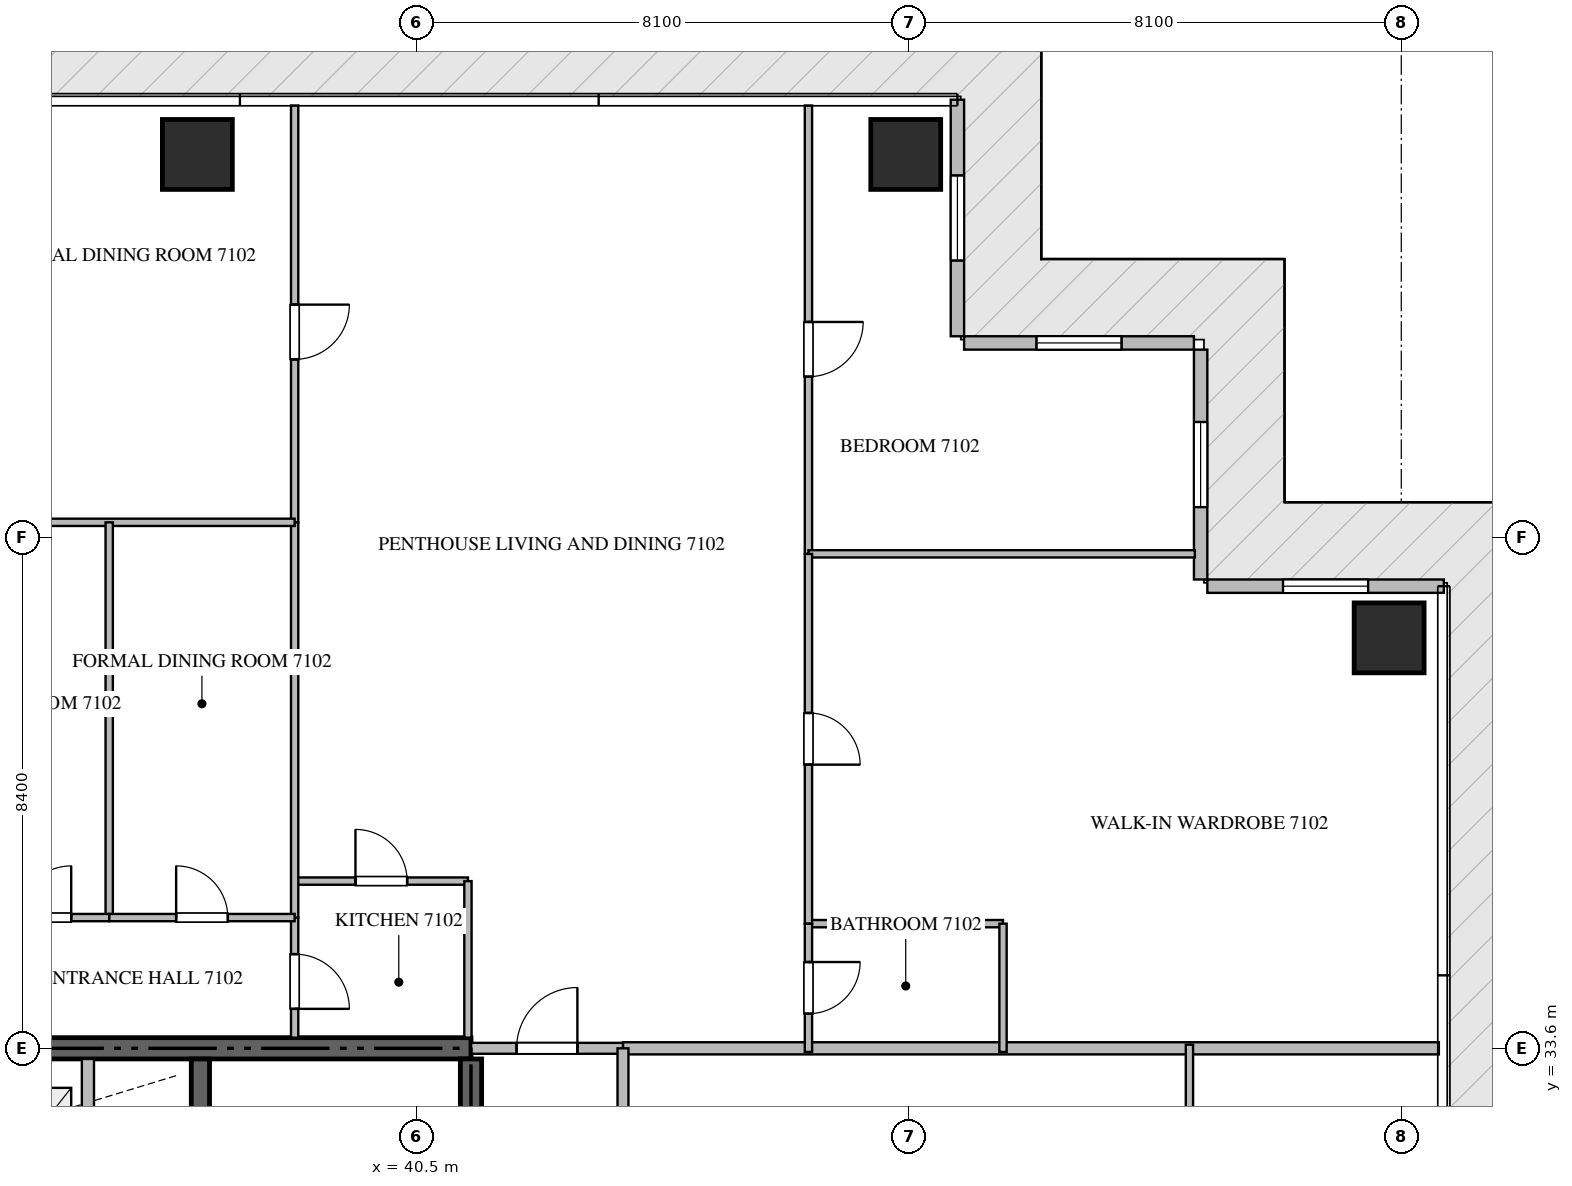
"""IFC4 building model, lengths in metres.
Left out: names, types, materials, properties, quantities, classifications, styles, units other than length and angle.
Written with IfcOpenShell. Run it as: python <this file> out.ifc"""

import sys

from ifc_helpers import new_model, si_unit, direction, frame, frame_2d, origin, origin_2d, place, context, subcontext, project, spatial, rectangle, extrude, source, transform, mapped, element, fill, save


model = new_model("IFC4")
c1 = context("Model", 3, precision=1e-05, world=origin(), true_north=direction((0.0, 1.0)))
c2 = subcontext(c1, "Body", "Model", "MODEL_VIEW")
j1 = project(units=[si_unit("LENGTHUNIT", "METRE"), si_unit("PLANEANGLEUNIT", "RADIAN")], contexts=[c1])
p1 = place(None, origin())
s1 = spatial("IfcSite", under=j1, at=p1, CompositionType="ELEMENT")
p2 = place(p1, origin())
s2 = spatial("IfcBuilding", under=s1, at=p2, CompositionType="ELEMENT")
p3 = place(p2, frame((0.0, 0.0, 283.6)))
s3 = spatial("IfcBuildingStorey", under=s2, at=p3, CompositionType="ELEMENT", Elevation=283.6)
p4 = place(p3, frame((41.4, 33.6, -0.26), z_axis=(0.0, 0.0, 1.0), x_axis=(-1.0, 0.0, 0.0)))
e1 = element("IfcWall", 1, at=p4, inside=s3, PredefinedType="SHEAR", context=c2, shape_type="SweptSolid", body=[
    extrude(rectangle(XDim=18.0, YDim=0.35, at=frame_2d((9.0, 0.0))), origin(), (0.0, 0.0, 1.0), 3.668),
])
p5 = place(p3, frame((41.4, 27.75, -0.26), z_axis=(0.0, 0.0, 1.0), x_axis=(0.0, 1.0, 0.0)))
e2 = element("IfcWall", 2, at=p5, inside=s3, PredefinedType="SHEAR", context=c2, shape_type="SweptSolid", body=[
    extrude(rectangle(XDim=5.675, YDim=0.35, at=frame_2d((2.837, 0.0))), origin(), (0.0, 0.0, 1.0), 3.668),
])
p6 = place(p3, frame((36.95, 27.05, -0.26), z_axis=(0.0, 0.0, 1.0), x_axis=(0.0, 1.0, 0.0)))
e3 = element("IfcWall", 3, at=p6, inside=s3, PredefinedType="SHEAR", context=c2, shape_type="SweptSolid", body=[
    extrude(rectangle(XDim=6.375, YDim=0.3, at=frame_2d((3.188, 0.0))), origin(), (0.0, 0.0, 1.0), 3.668),
])
m1 = source(origin(), c2, "Body", "SweptSolid", [
    extrude(rectangle(XDim=1.15, YDim=1.15, at=origin_2d()), origin(), (0.0, 0.0, 1.0), 3.67),
])
for number, where, z_axis, x_axis in (
    (4, (36.9, 48.3, -0.26), (0.0, 0.0, 1.0), (1.0, 0.0, 0.0)),
    (5, (48.55, 48.3, -0.26), (0.0, 0.0, 1.0), (1.0, 0.0, 0.0)),
    (6, (56.5, 40.35, -0.26), (0.0, 0.0, 1.0), (1.0, 0.0, 0.0)),
):
    element("IfcColumn", number, at=place(p3, frame(where, z_axis=z_axis, x_axis=x_axis)), inside=s3, PredefinedType="COLUMN", context=c2, shape_type="MappedRepresentation", body=[
        mapped(m1, transform((0.0, 0.0, 0.0), scale=1.0)),
    ])
p7 = place(p3, frame((57.4, 41.2, 0.0), z_axis=(0.0, 0.0, 1.0), x_axis=(-1.0, 0.0, 0.0)))
e7 = element("IfcWall", 7, at=p7, inside=s3, PredefinedType="ELEMENTEDWALL", context=c2, shape_type="SweptSolid", body=[
    extrude(rectangle(XDim=3.89, YDim=0.22, at=frame_2d((1.945, 0.0))), origin(), (0.0, 0.0, 1.0), 3.395),
])
p8 = place(p7, frame((1.245, 0.0, 0.65)))
e8 = element("IfcOpeningElement", 8, at=p8, cuts=e7, PredefinedType="OPENING", context=c2, shape_type="SweptSolid", body=[
    extrude(rectangle(XDim=1.4, YDim=1.35, at=frame_2d((0.7, 0.675))), frame((0.0, 0.12, 0.0), z_axis=(0.0, -1.0, 0.0), x_axis=(1.0, 0.0, 0.0)), (0.0, 0.0, 1.0), 0.24),
])
p9 = place(p3, frame((53.4, 41.31, 0.0), z_axis=(0.0, 0.0, 1.0), x_axis=(0.0, 1.0, 0.0)))
e9 = element("IfcWall", 9, at=p9, inside=s3, PredefinedType="ELEMENTEDWALL", context=c2, shape_type="SweptSolid", body=[
    extrude(rectangle(XDim=3.78, YDim=0.22, at=frame_2d((1.89, 0.0))), origin(), (0.0, 0.0, 1.0), 3.395),
])
p10 = place(p9, frame((1.19, 0.0, 0.65)))
e10 = element("IfcOpeningElement", 10, at=p10, cuts=e9, PredefinedType="OPENING", context=c2, shape_type="SweptSolid", body=[
    extrude(rectangle(XDim=1.4, YDim=1.35, at=frame_2d((0.7, 0.675))), frame((0.0, 0.12, 0.0), z_axis=(0.0, -1.0, 0.0), x_axis=(1.0, 0.0, 0.0)), (0.0, 0.0, 1.0), 0.24),
])
p11 = place(p3, frame((53.29, 45.2, 0.0), z_axis=(0.0, 0.0, 1.0), x_axis=(-1.0, 0.0, 0.0)))
e11 = element("IfcWall", 11, at=p11, inside=s3, PredefinedType="ELEMENTEDWALL", context=c2, shape_type="SweptSolid", body=[
    extrude(rectangle(XDim=3.78, YDim=0.22, at=frame_2d((1.89, 0.0))), origin(), (0.0, 0.0, 1.0), 3.395),
])
p12 = place(p11, frame((1.19, 0.0, 0.65)))
e12 = element("IfcOpeningElement", 12, at=p12, cuts=e11, PredefinedType="OPENING", context=c2, shape_type="SweptSolid", body=[
    extrude(rectangle(XDim=1.4, YDim=1.35, at=frame_2d((0.7, 0.675))), frame((0.0, 0.12, 0.0), z_axis=(0.0, -1.0, 0.0), x_axis=(1.0, 0.0, 0.0)), (0.0, 0.0, 1.0), 0.24),
])
p13 = place(p3, frame((49.4, 45.31, 0.0), z_axis=(0.0, 0.0, 1.0), x_axis=(0.0, 1.0, 0.0)))
e13 = element("IfcWall", 13, at=p13, inside=s3, PredefinedType="ELEMENTEDWALL", context=c2, shape_type="SweptSolid", body=[
    extrude(rectangle(XDim=3.89, YDim=0.22, at=frame_2d((1.945, 0.0))), origin(), (0.0, 0.0, 1.0), 3.395),
])
p14 = place(p13, frame((1.245, 0.0, 0.65)))
e14 = element("IfcOpeningElement", 14, at=p14, cuts=e13, PredefinedType="OPENING", context=c2, shape_type="SweptSolid", body=[
    extrude(rectangle(XDim=1.4, YDim=1.35, at=frame_2d((0.7, 0.675))), frame((0.0, 0.12, 0.0), z_axis=(0.0, -1.0, 0.0), x_axis=(1.0, 0.0, 0.0)), (0.0, 0.0, 1.0), 0.24),
])
p15 = place(p3, frame((35.1, 30.75, 0.0), z_axis=(0.0, 0.0, 1.0), x_axis=(0.0, 1.0, 0.0)))
e15 = element("IfcWall", 15, at=p15, inside=s3, PredefinedType="STANDARD", context=c2, shape_type="SweptSolid", body=[
    extrude(rectangle(XDim=2.675, YDim=0.2, at=frame_2d((1.337, 0.0))), origin(), (0.0, 0.0, 1.0), 3.41),
])
p16 = place(p3, frame((43.9, 33.6, 0.0), z_axis=(0.0, 0.0, 1.0), x_axis=(1.0, 0.0, 0.0)))
e16 = element("IfcWall", 16, at=p16, inside=s3, PredefinedType="PARTITIONING", context=c2, shape_type="SweptSolid", body=[
    extrude(rectangle(XDim=13.418, YDim=0.2, at=frame_2d((6.709, 0.0))), origin(), (0.0, 0.0, 1.0), 3.41),
])
p17 = place(p3, frame((41.402, 33.6, 0.0), z_axis=(0.0, 0.0, 1.0), x_axis=(1.0, 0.0, 0.0)))
e17 = element("IfcWall", 17, at=p17, inside=s3, PredefinedType="PARTITIONING", context=c2, shape_type="SweptSolid", body=[
    extrude(rectangle(XDim=2.496, YDim=0.18, at=frame_2d((1.248, 0.0))), origin(), (0.0, 0.0, 1.0), 3.41),
])
p18 = place(p17, frame((0.748, 0.0, 0.0)))
e18 = element("IfcOpeningElement", 18, at=p18, cuts=e17, PredefinedType="OPENING", context=c2, shape_type="SweptSolid", body=[
    extrude(rectangle(XDim=1.0, YDim=2.15, at=frame_2d((0.5, 1.075))), frame((0.0, 0.1, 0.0), z_axis=(0.0, -1.0, 0.0), x_axis=(1.0, 0.0, 0.0)), (0.0, 0.0, 1.0), 0.2),
])
p19 = place(p3, frame((43.9, 16.8, 0.0), z_axis=(0.0, 0.0, 1.0), x_axis=(0.0, 1.0, 0.0)))
e19 = element("IfcWall", 19, at=p19, inside=s3, PredefinedType="PARTITIONING", context=c2, shape_type="SweptSolid", body=[
    extrude(rectangle(XDim=16.8, YDim=0.18, at=frame_2d((8.4, 0.0))), origin(), (0.0, 0.0, 1.0), 3.41),
])
p20 = place(p19, frame((1.3, 0.0, 0.0)))
e20 = element("IfcOpeningElement", 20, at=p20, cuts=e19, PredefinedType="OPENING", context=c2, shape_type="SweptSolid", body=[
    extrude(rectangle(XDim=1.0, YDim=2.15, at=frame_2d((0.5, 1.075))), frame((0.0, 0.1, 0.0), z_axis=(0.0, -1.0, 0.0), x_axis=(1.0, 0.0, 0.0)), (0.0, 0.0, 1.0), 0.2),
])
p21 = place(p3, frame((38.5, 36.35, 0.0), z_axis=(0.0, 0.0, 1.0), x_axis=(1.0, 0.0, 0.0)))
e21 = element("IfcWall", 21, at=p21, inside=s3, PredefinedType="PARTITIONING", context=c2, shape_type="SweptSolid", body=[
    extrude(rectangle(XDim=2.85, YDim=0.12, at=frame_2d((1.425, 0.0))), origin(), (0.0, 0.0, 1.0), 3.41),
])
p22 = place(p21, frame((1.0, 0.0, 0.0)))
e22 = element("IfcOpeningElement", 22, at=p22, cuts=e21, PredefinedType="OPENING", context=c2, shape_type="SweptSolid", body=[
    extrude(rectangle(XDim=0.85, YDim=2.1, at=frame_2d((0.425, 1.05))), frame((0.0, 0.07, 0.0), z_axis=(0.0, -1.0, 0.0), x_axis=(1.0, 0.0, 0.0)), (0.0, 0.0, 1.0), 0.14),
])
p23 = place(p3, frame((41.35, 36.35, 0.0), z_axis=(0.0, 0.0, 1.0), x_axis=(0.0, -1.0, 0.0)))
e23 = element("IfcWall", 23, at=p23, inside=s3, PredefinedType="PARTITIONING", context=c2, shape_type="SweptSolid", body=[
    extrude(rectangle(XDim=2.575, YDim=0.12, at=frame_2d((1.288, 0.0))), origin(), (0.0, 0.0, 1.0), 3.41),
])
p24 = place(p3, frame((38.5, 35.75, 0.0), z_axis=(0.0, 0.0, 1.0), x_axis=(0.0, -1.0, 0.0)))
e24 = element("IfcWall", 24, at=p24, inside=s3, PredefinedType="PARTITIONING", context=c2, shape_type="SweptSolid", body=[
    extrude(rectangle(XDim=1.975, YDim=0.12, at=frame_2d((0.988, 0.0))), origin(), (0.0, 0.0, 1.0), 3.41),
])
p25 = place(p24, frame((0.601, 0.0, 0.0)))
e25 = element("IfcOpeningElement", 25, at=p25, cuts=e24, PredefinedType="OPENING", context=c2, shape_type="SweptSolid", body=[
    extrude(rectangle(XDim=0.9, YDim=2.1, at=frame_2d((0.45, 1.05))), frame((0.0, 0.07, 0.0), z_axis=(0.0, -1.0, 0.0), x_axis=(1.0, 0.0, 0.0)), (0.0, 0.0, 1.0), 0.14),
])
p26 = place(p3, frame((38.5, 49.105, 0.0), z_axis=(0.0, 0.0, 1.0), x_axis=(0.0, -1.0, 0.0)))
e26 = element("IfcWall", 26, at=p26, inside=s3, PredefinedType="PARTITIONING", context=c2, shape_type="SweptSolid", body=[
    extrude(rectangle(XDim=6.855, YDim=0.12, at=frame_2d((3.427, 0.0))), origin(), (0.0, 0.0, 1.0), 3.41),
])
p27 = place(p26, frame((3.275, 0.0, 0.0)))
e27 = element("IfcOpeningElement", 27, at=p27, cuts=e26, PredefinedType="OPENING", context=c2, shape_type="SweptSolid", body=[
    extrude(rectangle(XDim=0.9, YDim=2.1, at=frame_2d((0.45, 1.05))), frame((0.0, 0.07, 0.0), z_axis=(0.0, -1.0, 0.0), x_axis=(1.0, 0.0, 0.0)), (0.0, 0.0, 1.0), 0.14),
])
p28 = place(p3, frame((38.5, 42.248, 0.0), z_axis=(0.0, 0.0, 1.0), x_axis=(0.0, -1.0, 0.0)))
e28 = element("IfcWall", 28, at=p28, inside=s3, PredefinedType="PARTITIONING", context=c2, shape_type="SweptSolid", body=[
    extrude(rectangle(XDim=6.496, YDim=0.12, at=frame_2d((3.248, 0.0))), origin(), (0.0, 0.0, 1.0), 3.41),
])
p29 = place(p3, frame((33.35, 42.25, 0.0), z_axis=(0.0, 0.0, 1.0), x_axis=(1.0, 0.0, 0.0)))
e29 = element("IfcWall", 29, at=p29, inside=s3, PredefinedType="PARTITIONING", context=c2, shape_type="SweptSolid", body=[
    extrude(rectangle(XDim=5.15, YDim=0.12, at=frame_2d((2.575, 0.0))), origin(), (0.0, 0.0, 1.0), 3.41),
])
p30 = place(p3, frame((35.45, 42.25, 0.0), z_axis=(0.0, 0.0, 1.0), x_axis=(0.0, -1.0, 0.0)))
e30 = element("IfcWall", 30, at=p30, inside=s3, PredefinedType="PARTITIONING", context=c2, shape_type="SweptSolid", body=[
    extrude(rectangle(XDim=6.5, YDim=0.12, at=frame_2d((3.25, 0.0))), origin(), (0.0, 0.0, 1.0), 3.41),
])
p31 = place(p3, frame((33.35, 35.75, 0.0), z_axis=(0.0, 0.0, 1.0), x_axis=(1.0, 0.0, 0.0)))
e31 = element("IfcWall", 31, at=p31, inside=s3, PredefinedType="PARTITIONING", context=c2, shape_type="SweptSolid", body=[
    extrude(rectangle(XDim=2.1, YDim=0.12, at=frame_2d((1.05, 0.0))), origin(), (0.0, 0.0, 1.0), 3.41),
])
p32 = place(p31, frame((0.625, 0.0, 0.0)))
e32 = element("IfcOpeningElement", 32, at=p32, cuts=e31, PredefinedType="OPENING", context=c2, shape_type="SweptSolid", body=[
    extrude(rectangle(XDim=0.85, YDim=2.1, at=frame_2d((0.425, 1.05))), frame((0.0, 0.07, 0.0), z_axis=(0.0, -1.0, 0.0), x_axis=(1.0, 0.0, 0.0)), (0.0, 0.0, 1.0), 0.14),
])
p33 = place(p3, frame((35.452, 35.75, 0.0), z_axis=(0.0, 0.0, 1.0), x_axis=(1.0, 0.0, 0.0)))
e33 = element("IfcWall", 33, at=p33, inside=s3, PredefinedType="PARTITIONING", context=c2, shape_type="SweptSolid", body=[
    extrude(rectangle(XDim=3.048, YDim=0.12, at=frame_2d((1.524, 0.0))), origin(), (0.0, 0.0, 1.0), 3.41),
])
p34 = place(p33, frame((1.099, 0.0, 0.0)))
e34 = element("IfcOpeningElement", 34, at=p34, cuts=e33, PredefinedType="OPENING", context=c2, shape_type="SweptSolid", body=[
    extrude(rectangle(XDim=0.85, YDim=2.1, at=frame_2d((0.425, 1.05))), frame((0.0, 0.07, 0.0), z_axis=(0.0, -1.0, 0.0), x_axis=(1.0, 0.0, 0.0)), (0.0, 0.0, 1.0), 0.14),
])
p35 = place(p3, frame((46.95, 49.105, 0.0), z_axis=(0.0, 0.0, 1.0), x_axis=(0.0, -1.0, 0.0)))
e35 = element("IfcWall", 35, at=p35, inside=s3, PredefinedType="PARTITIONING", context=c2, shape_type="SweptSolid", body=[
    extrude(rectangle(XDim=7.373, YDim=0.12, at=frame_2d((3.687, 0.0))), origin(), (0.0, 0.0, 1.0), 3.41),
])
p36 = place(p35, frame((3.56, 0.0, 0.0)))
e36 = element("IfcOpeningElement", 36, at=p36, cuts=e35, PredefinedType="OPENING", context=c2, shape_type="SweptSolid", body=[
    extrude(rectangle(XDim=0.9, YDim=2.1, at=frame_2d((0.45, 1.05))), frame((0.0, 0.07, 0.0), z_axis=(0.0, -1.0, 0.0), x_axis=(1.0, 0.0, 0.0)), (0.0, 0.0, 1.0), 0.14),
])
p37 = place(p3, frame((46.95, 41.732, 0.0), z_axis=(0.0, 0.0, 1.0), x_axis=(1.0, 0.0, 0.0)))
e37 = element("IfcWall", 37, at=p37, inside=s3, PredefinedType="PARTITIONING", context=c2, shape_type="SweptSolid", body=[
    extrude(rectangle(XDim=6.355, YDim=0.12, at=frame_2d((3.177, 0.0))), origin(), (0.0, 0.0, 1.0), 3.41),
])
p38 = place(p3, frame((46.95, 35.65, 0.0), z_axis=(0.0, 0.0, 1.0), x_axis=(1.0, 0.0, 0.0)))
e38 = element("IfcWall", 38, at=p38, inside=s3, PredefinedType="PARTITIONING", context=c2, shape_type="SweptSolid", body=[
    extrude(rectangle(XDim=3.2, YDim=0.12, at=frame_2d((1.6, 0.0))), origin(), (0.0, 0.0, 1.0), 3.41),
])
p39 = place(p3, frame((50.15, 35.65, 0.0), z_axis=(0.0, 0.0, 1.0), x_axis=(0.0, -1.0, 0.0)))
e39 = element("IfcWall", 39, at=p39, inside=s3, PredefinedType="PARTITIONING", context=c2, shape_type="SweptSolid", body=[
    extrude(rectangle(XDim=2.11, YDim=0.12, at=frame_2d((1.055, 0.0))), origin(), (0.0, 0.0, 1.0), 3.41),
])
p40 = place(p3, frame((46.95, 41.73, 0.0), z_axis=(0.0, 0.0, 1.0), x_axis=(0.0, -1.0, 0.0)))
e40 = element("IfcWall", 40, at=p40, inside=s3, PredefinedType="PARTITIONING", context=c2, shape_type="SweptSolid", body=[
    extrude(rectangle(XDim=6.08, YDim=0.12, at=frame_2d((3.04, 0.0))), origin(), (0.0, 0.0, 1.0), 3.41),
])
p41 = place(p40, frame((2.615, 0.0, 0.0)))
e41 = element("IfcOpeningElement", 41, at=p41, cuts=e40, PredefinedType="OPENING", context=c2, shape_type="SweptSolid", body=[
    extrude(rectangle(XDim=0.85, YDim=2.1, at=frame_2d((0.425, 1.05))), frame((0.0, 0.07, 0.0), z_axis=(0.0, -1.0, 0.0), x_axis=(1.0, 0.0, 0.0)), (0.0, 0.0, 1.0), 0.14),
])
p42 = place(p3, frame((46.95, 35.648, 0.0), z_axis=(0.0, 0.0, 1.0), x_axis=(0.0, -1.0, 0.0)))
e42 = element("IfcWall", 42, at=p42, inside=s3, PredefinedType="PARTITIONING", context=c2, shape_type="SweptSolid", body=[
    extrude(rectangle(XDim=2.108, YDim=0.12, at=frame_2d((1.054, 0.0))), origin(), (0.0, 0.0, 1.0), 3.41),
])
p43 = place(p42, frame((0.629, 0.0, 0.0)))
e43 = element("IfcOpeningElement", 43, at=p43, cuts=e42, PredefinedType="OPENING", context=c2, shape_type="SweptSolid", body=[
    extrude(rectangle(XDim=0.85, YDim=2.1, at=frame_2d((0.425, 1.05))), frame((0.0, 0.07, 0.0), z_axis=(0.0, -1.0, 0.0), x_axis=(1.0, 0.0, 0.0)), (0.0, 0.0, 1.0), 0.14),
])
p44 = place(p3, frame((53.216, 23.18, 0.0), z_axis=(0.0, 0.0, 1.0), x_axis=(0.0, 1.0, 0.0)))
e44 = element("IfcWall", 44, at=p44, inside=s3, PredefinedType="PARTITIONING", context=c2, shape_type="SweptSolid", body=[
    extrude(rectangle(XDim=10.48, YDim=0.12, at=frame_2d((5.24, 0.0))), origin(), (0.0, 0.0, 1.0), 3.41),
])
m2 = source(origin(), c2, "Body", "SweptSolid", [
    extrude(rectangle(XDim=1.4, YDim=1.35, at=frame_2d((0.7, 0.675))), frame((0.0, 0.03, 0.0), z_axis=(0.0, -1.0, 0.0), x_axis=(1.0, 0.0, 0.0)), (0.0, 0.0, 1.0), 0.06),
])
p45 = place(p8, origin())
e45 = element("IfcWindow", 45, at=p45, inside=s3, PartitioningType="SINGLE_PANEL", PredefinedType="WINDOW", context=c2, shape_type="MappedRepresentation", body=[
    mapped(m2, transform((0.0, 0.0, 0.0), scale=1.0)),
])
fill(e8, e45)
p46 = place(p10, origin())
e46 = element("IfcWindow", 46, at=p46, inside=s3, PartitioningType="SINGLE_PANEL", PredefinedType="WINDOW", context=c2, shape_type="MappedRepresentation", body=[
    mapped(m2, transform((0.0, 0.0, 0.0), scale=1.0)),
])
fill(e10, e46)
p47 = place(p12, origin())
e47 = element("IfcWindow", 47, at=p47, inside=s3, PartitioningType="SINGLE_PANEL", PredefinedType="WINDOW", context=c2, shape_type="MappedRepresentation", body=[
    mapped(m2, transform((0.0, 0.0, 0.0), scale=1.0)),
])
fill(e12, e47)
p48 = place(p14, origin())
e48 = element("IfcWindow", 48, at=p48, inside=s3, PartitioningType="SINGLE_PANEL", PredefinedType="WINDOW", context=c2, shape_type="MappedRepresentation", body=[
    mapped(m2, transform((0.0, 0.0, 0.0), scale=1.0)),
])
fill(e14, e48)
m3 = source(origin(), c2, "Body", "SweptSolid", [
    extrude(rectangle(XDim=1.0, YDim=2.15, at=frame_2d((0.5, 1.075))), frame((0.0, 0.025, 0.0), z_axis=(0.0, -1.0, 0.0), x_axis=(1.0, 0.0, 0.0)), (0.0, 0.0, 1.0), 0.05),
])
p49 = place(p18, origin())
e49 = element("IfcDoor", 49, at=p49, inside=s3, OperationType="SINGLE_SWING_RIGHT", PredefinedType="DOOR", context=c2, shape_type="MappedRepresentation", body=[
    mapped(m3, transform((0.0, 0.0, 0.0), scale=1.0)),
])
fill(e18, e49)
m4 = source(origin(), c2, "Body", "SweptSolid", [
    extrude(rectangle(XDim=0.85, YDim=2.1, at=frame_2d((0.425, 1.05))), frame((0.0, 0.025, 0.0), z_axis=(0.0, -1.0, 0.0), x_axis=(1.0, 0.0, 0.0)), (0.0, 0.0, 1.0), 0.05),
])
p50 = place(p22, origin())
e50 = element("IfcDoor", 50, at=p50, inside=s3, OperationType="SINGLE_SWING_LEFT", PredefinedType="DOOR", context=c2, shape_type="MappedRepresentation", body=[
    mapped(m4, transform((0.0, 0.0, 0.0), scale=1.0)),
])
fill(e22, e50)
m5 = source(origin(), c2, "Body", "SweptSolid", [
    extrude(rectangle(XDim=0.9, YDim=2.1, at=frame_2d((0.45, 1.05))), frame((0.0, 0.025, 0.0), z_axis=(0.0, -1.0, 0.0), x_axis=(1.0, 0.0, 0.0)), (0.0, 0.0, 1.0), 0.05),
])
p51 = place(p25, origin())
e51 = element("IfcDoor", 51, at=p51, inside=s3, OperationType="SINGLE_SWING_RIGHT", PredefinedType="DOOR", context=c2, shape_type="MappedRepresentation", body=[
    mapped(m5, transform((0.0, 0.0, 0.0), scale=1.0)),
])
fill(e25, e51)
p52 = place(p27, origin())
e52 = element("IfcDoor", 52, at=p52, inside=s3, OperationType="SINGLE_SWING_LEFT", PredefinedType="DOOR", context=c2, shape_type="MappedRepresentation", body=[
    mapped(m5, transform((0.0, 0.0, 0.0), scale=1.0)),
])
fill(e27, e52)
p53 = place(p32, origin())
e53 = element("IfcDoor", 53, at=p53, inside=s3, OperationType="SINGLE_SWING_RIGHT", PredefinedType="DOOR", context=c2, shape_type="MappedRepresentation", body=[
    mapped(m4, transform((0.0, 0.0, 0.0), scale=1.0)),
])
fill(e32, e53)
p54 = place(p34, origin())
e54 = element("IfcDoor", 54, at=p54, inside=s3, OperationType="SINGLE_SWING_LEFT", PredefinedType="DOOR", context=c2, shape_type="MappedRepresentation", body=[
    mapped(m4, transform((0.0, 0.0, 0.0), scale=1.0)),
])
fill(e34, e54)
p55 = place(p36, origin())
e55 = element("IfcDoor", 55, at=p55, inside=s3, OperationType="SINGLE_SWING_LEFT", PredefinedType="DOOR", context=c2, shape_type="MappedRepresentation", body=[
    mapped(m5, transform((0.0, 0.0, 0.0), scale=1.0)),
])
fill(e36, e55)
p56 = place(p41, origin())
e56 = element("IfcDoor", 56, at=p56, inside=s3, OperationType="SINGLE_SWING_RIGHT", PredefinedType="DOOR", context=c2, shape_type="MappedRepresentation", body=[
    mapped(m4, transform((0.0, 0.0, 0.0), scale=1.0)),
])
fill(e41, e56)
p57 = place(p43, origin())
e57 = element("IfcDoor", 57, at=p57, inside=s3, OperationType="SINGLE_SWING_LEFT", PredefinedType="DOOR", context=c2, shape_type="MappedRepresentation", body=[
    mapped(m4, transform((0.0, 0.0, 0.0), scale=1.0)),
])
fill(e43, e57)
save(model, sys.argv[1])
